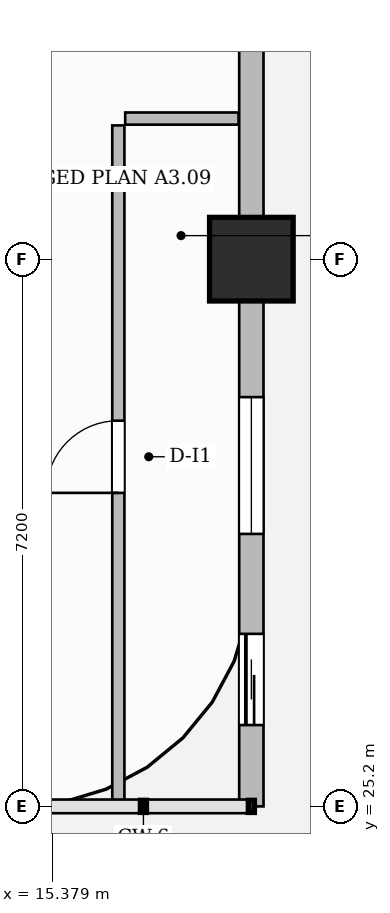
"""IFC4 building model, lengths in metres.
Left out: names, types, materials, properties, quantities, classifications, styles, units other than length and angle.
Written with IfcOpenShell. Run it as: python <this file> out.ifc"""

import sys

from ifc_helpers import new_model, si_unit, direction, frame, frame_2d, origin, origin_2d, place, context, subcontext, project, spatial, rectangle, extrude, source, transform, mapped, element, fill, save


model = new_model("IFC4")
c1 = context("Model", 3, precision=1e-05, world=origin(), true_north=direction((0.0, 1.0)))
c2 = subcontext(c1, "Body", "Model", "MODEL_VIEW")
j1 = project(units=[si_unit("LENGTHUNIT", "METRE"), si_unit("PLANEANGLEUNIT", "RADIAN")], contexts=[c1])
p1 = place(None, origin())
s1 = spatial("IfcSite", under=j1, at=p1, CompositionType="ELEMENT")
p2 = place(p1, origin())
s2 = spatial("IfcBuilding", under=s1, at=p2, CompositionType="ELEMENT")
p3 = place(p2, frame((0.0, 0.0, 47.2)))
s3 = spatial("IfcBuildingStorey", under=s2, at=p3, CompositionType="ELEMENT", Elevation=47.2)
m1 = source(origin(), c2, "Body", "SweptSolid", [
    extrude(rectangle(XDim=1.1, YDim=1.1, at=origin_2d()), origin(), (0.0, 0.0, 1.0), 3.7),
])
p4 = place(p3, frame((18.0, 32.4, 0.0), z_axis=(0.0, 0.0, 1.0), x_axis=(1.0, 0.0, 0.0)))
e1 = element("IfcColumn", 1, at=p4, inside=s3, PredefinedType="COLUMN", context=c2, shape_type="MappedRepresentation", body=[
    mapped(m1, transform((0.0, 0.0, 0.0), scale=1.0)),
])
p5 = place(p3, frame((16.25, 25.228, 0.0), z_axis=(0.0, 0.0, 1.0), x_axis=(0.0, 1.0, 0.0)))
e2 = element("IfcWall", 2, at=p5, inside=s3, PredefinedType="PARTITIONING", context=c2, shape_type="SweptSolid", body=[
    extrude(rectangle(XDim=8.932, YDim=0.16, at=frame_2d((4.466, 0.0))), origin(), (0.0, 0.0, 1.0), 3.45),
])
p6 = place(p5, frame((4.097, 0.0, 0.0)))
e3 = element("IfcOpeningElement", 3, at=p6, cuts=e2, PredefinedType="OPENING", context=c2, shape_type="SweptSolid", body=[
    extrude(rectangle(XDim=0.95, YDim=2.15, at=frame_2d((0.475, 1.075))), frame((0.0, 0.09, 0.0), z_axis=(0.0, -1.0, 0.0), x_axis=(1.0, 0.0, 0.0)), (0.0, 0.0, 1.0), 0.18),
])
p7 = place(p3, frame((16.34, 34.25, 0.0), z_axis=(0.0, 0.0, 1.0), x_axis=(1.0, 0.0, 0.0)))
e4 = element("IfcWall", 4, at=p7, inside=s3, PredefinedType="PARTITIONING", context=c2, shape_type="SweptSolid", body=[
    extrude(rectangle(XDim=1.492, YDim=0.16, at=frame_2d((0.746, 0.0))), origin(), (0.0, 0.0, 1.0), 3.45),
])
p8 = place(p3, frame((18.0, 25.2, 0.0), z_axis=(0.0, 0.0, 1.0), x_axis=(0.0, 1.0, 0.0)))
e5 = element("IfcWall", 5, at=p8, inside=s3, PredefinedType="SOLIDWALL", context=c2, shape_type="SweptSolid", body=[
    extrude(rectangle(XDim=21.55, YDim=0.32, at=frame_2d((10.775, 0.0))), origin(), (0.0, 0.0, 1.0), 3.45),
])
p9 = place(p8, frame((18.5, 0.0, 0.0)))
e6 = element("IfcOpeningElement", 6, at=p9, cuts=e5, PredefinedType="OPENING", context=c2, shape_type="SweptSolid", body=[
    extrude(rectangle(XDim=1.2, YDim=2.2, at=frame_2d((0.6, 1.1))), frame((0.0, 0.17, 0.0), z_axis=(0.0, -1.0, 0.0), x_axis=(1.0, 0.0, 0.0)), (0.0, 0.0, 1.0), 0.34),
])
p10 = place(p8, frame((1.07, 0.0, 0.0)))
e7 = element("IfcOpeningElement", 7, at=p10, cuts=e5, PredefinedType="OPENING", context=c2, shape_type="SweptSolid", body=[
    extrude(rectangle(XDim=1.2, YDim=2.2, at=frame_2d((0.6, 1.1))), frame((0.0, 0.17, 0.0), z_axis=(0.0, -1.0, 0.0), x_axis=(1.0, 0.0, 0.0)), (0.0, 0.0, 1.0), 0.34),
])
p11 = place(p8, frame((3.585, 0.0, 0.8)))
e8 = element("IfcOpeningElement", 8, at=p11, cuts=e5, PredefinedType="OPENING", context=c2, shape_type="SweptSolid", body=[
    extrude(rectangle(XDim=1.8, YDim=1.85, at=frame_2d((0.9, 0.925))), frame((0.0, 0.17, 0.0), z_axis=(0.0, -1.0, 0.0), x_axis=(1.0, 0.0, 0.0)), (0.0, 0.0, 1.0), 0.34),
])
p12 = place(p8, frame((10.428, 0.0, 0.8)))
e9 = element("IfcOpeningElement", 9, at=p12, cuts=e5, PredefinedType="OPENING", context=c2, shape_type="SweptSolid", body=[
    extrude(rectangle(XDim=1.8, YDim=1.85, at=frame_2d((0.9, 0.925))), frame((0.0, 0.17, 0.0), z_axis=(0.0, -1.0, 0.0), x_axis=(1.0, 0.0, 0.0)), (0.0, 0.0, 1.0), 0.34),
])
p13 = place(p8, frame((15.8, 0.0, 0.8)))
e10 = element("IfcOpeningElement", 10, at=p13, cuts=e5, PredefinedType="OPENING", context=c2, shape_type="SweptSolid", body=[
    extrude(rectangle(XDim=1.8, YDim=1.85, at=frame_2d((0.9, 0.925))), frame((0.0, 0.17, 0.0), z_axis=(0.0, -1.0, 0.0), x_axis=(1.0, 0.0, 0.0)), (0.0, 0.0, 1.0), 0.34),
])
m2 = source(origin(), c2, "Body", "SweptSolid", [
    extrude(rectangle(XDim=0.95, YDim=2.15, at=frame_2d((0.475, 1.075))), frame((0.0, 0.025, 0.0), z_axis=(0.0, -1.0, 0.0), x_axis=(1.0, 0.0, 0.0)), (0.0, 0.0, 1.0), 0.05),
])
p14 = place(p6, origin())
e11 = element("IfcDoor", 11, at=p14, inside=s3, OperationType="SINGLE_SWING_LEFT", PredefinedType="DOOR", context=c2, shape_type="MappedRepresentation", body=[
    mapped(m2, transform((0.0, 0.0, 0.0), scale=1.0)),
])
fill(e3, e11)
m3 = source(origin(), c2, "Body", "SweptSolid", [
    extrude(rectangle(XDim=1.2, YDim=2.2, at=frame_2d((0.6, 1.1))), frame((0.0, 0.025, 0.0), z_axis=(0.0, -1.0, 0.0), x_axis=(1.0, 0.0, 0.0)), (0.0, 0.0, 1.0), 0.05),
])
p15 = place(p10, origin())
e12 = element("IfcDoor", 12, at=p15, inside=s3, OperationType="SLIDING_TO_LEFT", PredefinedType="DOOR", context=c2, shape_type="MappedRepresentation", body=[
    mapped(m3, transform((0.0, 0.0, 0.0), scale=1.0)),
])
fill(e7, e12)
m4 = source(origin(), c2, "Body", "SweptSolid", [
    extrude(rectangle(XDim=1.8, YDim=1.85, at=frame_2d((0.9, 0.925))), frame((0.0, 0.03, 0.0), z_axis=(0.0, -1.0, 0.0), x_axis=(1.0, 0.0, 0.0)), (0.0, 0.0, 1.0), 0.06),
])
p16 = place(p11, origin())
e13 = element("IfcWindow", 13, at=p16, inside=s3, PartitioningType="DOUBLE_PANEL_VERTICAL", PredefinedType="WINDOW", context=c2, shape_type="MappedRepresentation", body=[
    mapped(m4, transform((0.0, 0.0, 0.0), scale=1.0)),
])
fill(e8, e13)
save(model, sys.argv[1])
